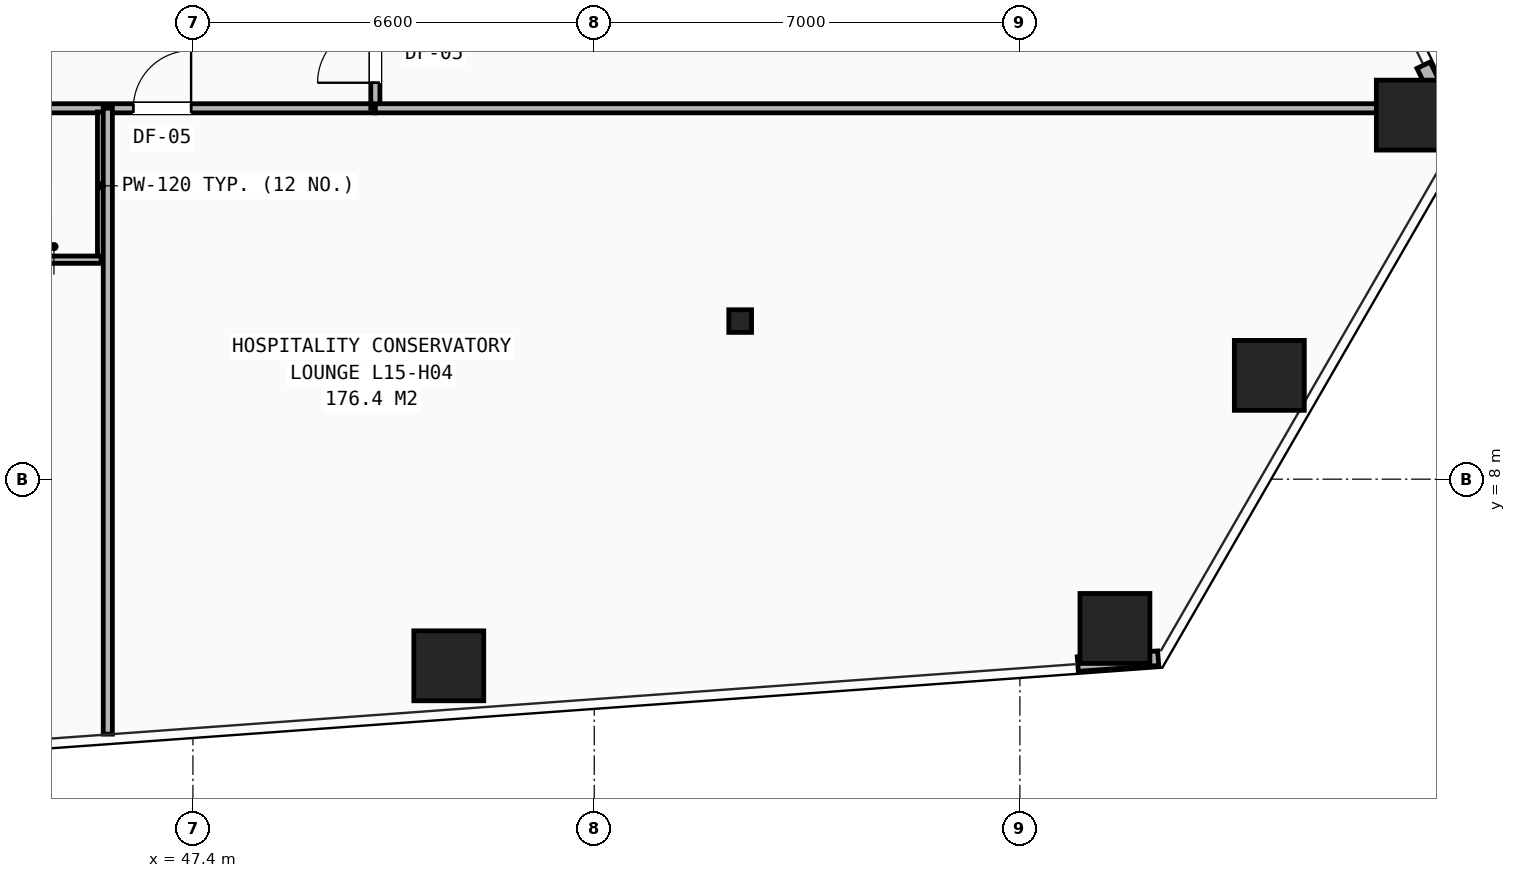
"""IFC4 building model, lengths in metres.
Left out: names, types, materials, properties, quantities, classifications, styles, units other than length and angle.
Written with IfcOpenShell. Run it as: python <this file> out.ifc"""

import sys

from ifc_helpers import new_model, si_unit, direction, frame, frame_2d, origin, origin_2d, place, context, subcontext, project, spatial, rectangle, hollow_rectangle, i_section, extrude, element, fill, save


model = new_model("IFC4")
c1 = context("Model", 3, precision=1e-05, world=origin(), true_north=direction((0.0, 1.0)))
c2 = subcontext(c1, "Body", "Model", "MODEL_VIEW")
j1 = project(units=[si_unit("LENGTHUNIT", "METRE"), si_unit("PLANEANGLEUNIT", "RADIAN")], contexts=[c1])
p1 = place(None, origin())
s1 = spatial("IfcSite", under=j1, at=p1, CompositionType="ELEMENT")
p2 = place(p1, origin())
s2 = spatial("IfcBuilding", under=s1, at=p2, CompositionType="ELEMENT")
p3 = place(p2, frame((0.0, 0.0, 56.0)))
s3 = spatial("IfcBuildingStorey", under=s2, at=p3, CompositionType="ELEMENT", Elevation=56.0)
p4 = place(p3, frame((56.4, 10.6, 0.0), z_axis=(0.0, 0.0, 1.0), x_axis=(1.0, 0.0, 0.0)))
e1 = element("IfcColumn", 1, at=p4, inside=s3, PredefinedType="COLUMN", context=c2, shape_type="SweptSolid", body=[
    extrude(i_section(OverallWidth=0.374, OverallDepth=0.372, WebThickness=0.016, FlangeThickness=0.026, at=origin_2d()), origin(), (0.0, 0.0, 1.0), 3.2),
])
for number, where, z_axis, x_axis in (
    (2, (51.608, 4.93, 0.0), (0.0, 0.0, 1.0), (1.0, 0.0, 0.0)),
    (3, (62.563, 5.545, 0.0), (0.0, 0.0, 1.0), (1.0, 0.0, 0.0)),
    (4, (65.102, 9.707, 0.0), (0.0, 0.0, 1.0), (1.0, 0.0, 0.0)),
    (5, (67.437, 13.988, 0.0), (0.0, 0.0, 1.0), (1.0, 0.0, 0.0)),
):
    element("IfcColumn", number, at=place(p3, frame(where, z_axis=z_axis, x_axis=x_axis)), inside=s3, PredefinedType="COLUMN", context=c2, shape_type="SweptSolid", body=[
        extrude(hollow_rectangle(XDim=1.15, YDim=1.15, WallThickness=0.075, at=origin_2d()), origin(), (0.0, 0.0, 1.0), 3.2),
    ])
p5 = place(p3, frame((61.952, 4.959, 0.0), z_axis=(0.0, 0.0, 1.0), x_axis=(0.997376707961, 0.072385788777, 0.0)))
e6 = element("IfcWall", 6, at=p5, inside=s3, PredefinedType="SHEAR", context=c2, shape_type="SweptSolid", body=[
    extrude(rectangle(XDim=1.325, YDim=0.24, at=frame_2d((0.663, 0.0))), origin(), (0.0, 0.0, 1.0), 2.263),
])
p6 = place(p3, frame((68.217, 13.615, 0.0), z_axis=(0.0, 0.0, 1.0), x_axis=(-0.435989010646, 0.89995198905, 0.0)))
e7 = element("IfcWall", 7, at=p6, inside=s3, PredefinedType="SHEAR", context=c2, shape_type="SweptSolid", body=[
    extrude(rectangle(XDim=1.327, YDim=0.24, at=frame_2d((0.663, 0.0))), origin(), (0.0, 0.0, 1.0), 2.263),
])
p7 = place(p3, frame((29.6, 14.1, 0.0), z_axis=(0.0, 0.0, 1.0), x_axis=(1.0, 0.0, 0.0)))
e8 = element("IfcWall", 8, at=p7, inside=s3, PredefinedType="PARTITIONING", context=c2, shape_type="SweptSolid", body=[
    extrude(rectangle(XDim=20.8, YDim=0.15, at=frame_2d((10.4, 0.0))), origin(), (0.0, 0.0, 1.0), 2.431),
])
p8 = place(p7, frame((0.57, 0.0, 0.0)))
e9 = element("IfcOpeningElement", 9, at=p8, cuts=e8, PredefinedType="OPENING", context=c2, shape_type="SweptSolid", body=[
    extrude(rectangle(XDim=0.95, YDim=2.1, at=frame_2d((0.475, 1.05))), frame((0.0, 0.085, 0.0), z_axis=(0.0, -1.0, 0.0), x_axis=(1.0, 0.0, 0.0)), (0.0, 0.0, 1.0), 0.17),
])
p9 = place(p7, frame((4.82, 0.0, 0.0)))
e10 = element("IfcOpeningElement", 10, at=p9, cuts=e8, PredefinedType="OPENING", context=c2, shape_type="SweptSolid", body=[
    extrude(rectangle(XDim=0.95, YDim=2.1, at=frame_2d((0.475, 1.05))), frame((0.0, 0.085, 0.0), z_axis=(0.0, -1.0, 0.0), x_axis=(1.0, 0.0, 0.0)), (0.0, 0.0, 1.0), 0.17),
])
p10 = place(p7, frame((10.82, 0.0, 0.0)))
e11 = element("IfcOpeningElement", 11, at=p10, cuts=e8, PredefinedType="OPENING", context=c2, shape_type="SweptSolid", body=[
    extrude(rectangle(XDim=0.95, YDim=2.1, at=frame_2d((0.475, 1.05))), frame((0.0, 0.085, 0.0), z_axis=(0.0, -1.0, 0.0), x_axis=(1.0, 0.0, 0.0)), (0.0, 0.0, 1.0), 0.17),
])
p11 = place(p7, frame((16.82, 0.0, 0.0)))
e12 = element("IfcOpeningElement", 12, at=p11, cuts=e8, PredefinedType="OPENING", context=c2, shape_type="SweptSolid", body=[
    extrude(rectangle(XDim=0.95, YDim=2.1, at=frame_2d((0.475, 1.05))), frame((0.0, 0.085, 0.0), z_axis=(0.0, -1.0, 0.0), x_axis=(1.0, 0.0, 0.0)), (0.0, 0.0, 1.0), 0.17),
])
p12 = place(p3, frame((50.4, 14.1, 0.0), z_axis=(0.0, 0.0, 1.0), x_axis=(0.0, 1.0, 0.0)))
e13 = element("IfcWall", 13, at=p12, inside=s3, PredefinedType="PARTITIONING", context=c2, shape_type="SweptSolid", body=[
    extrude(rectangle(XDim=21.9, YDim=0.15, at=frame_2d((10.95, 0.0))), origin(), (0.0, 0.0, 1.0), 2.431),
])
p13 = place(p12, frame((0.42, 0.0, 0.0)))
e14 = element("IfcOpeningElement", 14, at=p13, cuts=e13, PredefinedType="OPENING", context=c2, shape_type="SweptSolid", body=[
    extrude(rectangle(XDim=0.95, YDim=2.1, at=frame_2d((0.475, 1.05))), frame((0.0, 0.085, 0.0), z_axis=(0.0, -1.0, 0.0), x_axis=(1.0, 0.0, 0.0)), (0.0, 0.0, 1.0), 0.17),
])
p14 = place(p12, frame((11.52, 0.0, 0.0)))
e15 = element("IfcOpeningElement", 15, at=p14, cuts=e13, PredefinedType="OPENING", context=c2, shape_type="SweptSolid", body=[
    extrude(rectangle(XDim=0.95, YDim=2.1, at=frame_2d((0.475, 1.05))), frame((0.0, 0.085, 0.0), z_axis=(0.0, -1.0, 0.0), x_axis=(1.0, 0.0, 0.0)), (0.0, 0.0, 1.0), 0.17),
])
p15 = place(p3, frame((45.89, 11.61, 0.0), z_axis=(0.0, 0.0, 1.0), x_axis=(0.0, 1.0, 0.0)))
e16 = element("IfcWall", 16, at=p15, inside=s3, PredefinedType="PARTITIONING", context=c2, shape_type="SweptSolid", body=[
    extrude(rectangle(XDim=2.43, YDim=0.12, at=frame_2d((1.215, 0.0))), origin(), (0.0, 0.0, 1.0), 2.98),
])
p16 = place(p3, frame((43.61, 11.61, 0.0), z_axis=(0.0, 0.0, 1.0), x_axis=(1.0, 0.0, 0.0)))
e17 = element("IfcWall", 17, at=p16, inside=s3, PredefinedType="PARTITIONING", context=c2, shape_type="SweptSolid", body=[
    extrude(rectangle(XDim=2.28, YDim=0.12, at=frame_2d((1.14, 0.0))), origin(), (0.0, 0.0, 1.0), 2.98),
])
p17 = place(p3, frame((46.0, 3.806, 0.0), z_axis=(0.0, 0.0, 1.0), x_axis=(0.0, 1.0, 0.0)))
e18 = element("IfcWall", 18, at=p17, inside=s3, PredefinedType="PARTITIONING", context=c2, shape_type="SweptSolid", body=[
    extrude(rectangle(XDim=10.294, YDim=0.15, at=frame_2d((5.147, 0.0))), origin(), (0.0, 0.0, 1.0), 2.268),
])
p18 = place(p3, frame((50.4, 14.1, 0.0), z_axis=(0.0, 0.0, 1.0), x_axis=(1.0, 0.0, 0.0)))
e19 = element("IfcWall", 19, at=p18, inside=s3, PredefinedType="PARTITIONING", context=c2, shape_type="SweptSolid", body=[
    extrude(rectangle(XDim=17.577, YDim=0.15, at=frame_2d((8.789, 0.0))), origin(), (0.0, 0.0, 1.0), 2.268),
])
p19 = place(p11, origin())
e20 = element("IfcDoor", 20, at=p19, inside=s3, OperationType="SINGLE_SWING_RIGHT", PredefinedType="DOOR", context=c2, shape_type="SweptSolid", body=[
    extrude(rectangle(XDim=0.95, YDim=2.1, at=frame_2d((0.475, 1.05))), frame((0.0, 0.025, 0.0), z_axis=(0.0, -1.0, 0.0), x_axis=(1.0, 0.0, 0.0)), (0.0, 0.0, 1.0), 0.05),
])
fill(e12, e20)
p20 = place(p13, origin())
e21 = element("IfcDoor", 21, at=p20, inside=s3, OperationType="SINGLE_SWING_LEFT", PredefinedType="DOOR", context=c2, shape_type="SweptSolid", body=[
    extrude(rectangle(XDim=0.95, YDim=2.1, at=frame_2d((0.475, 1.05))), frame((0.0, 0.025, 0.0), z_axis=(0.0, -1.0, 0.0), x_axis=(1.0, 0.0, 0.0)), (0.0, 0.0, 1.0), 0.05),
])
fill(e14, e21)
save(model, sys.argv[1])
